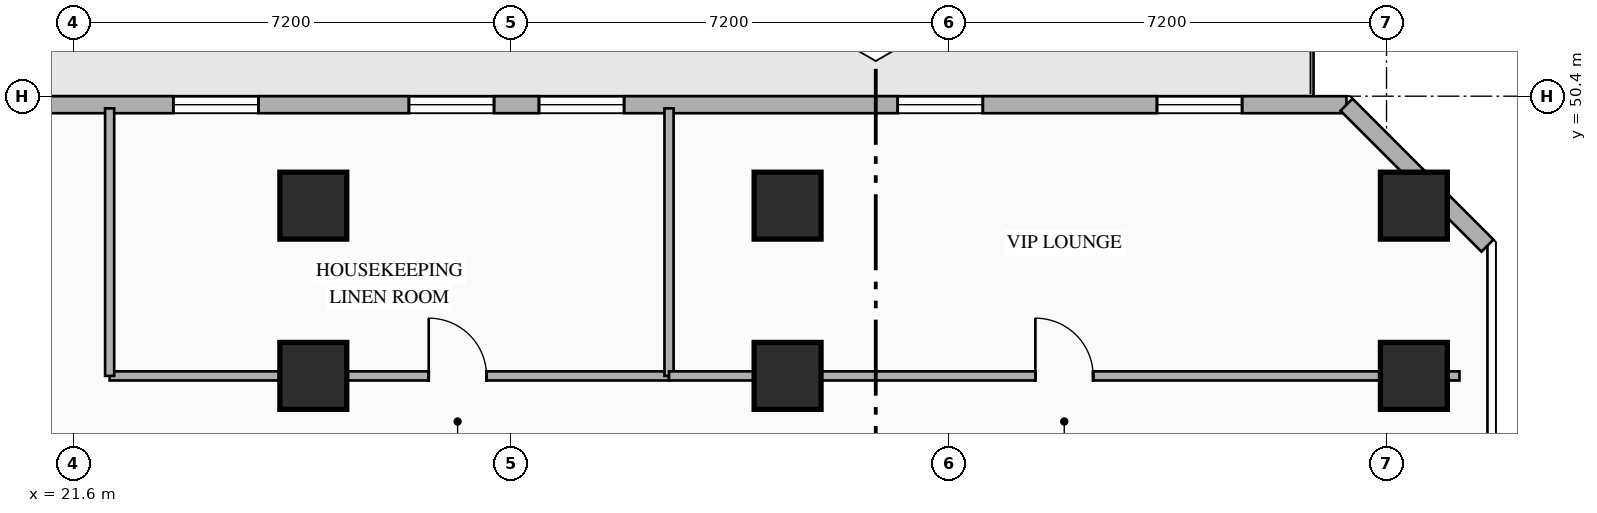
"""IFC4 building model, lengths in metres.
Left out: names, types, materials, properties, quantities, classifications, styles, units other than length and angle.
Written with IfcOpenShell. Run it as: python <this file> out.ifc"""

import sys

from ifc_helpers import new_model, si_unit, direction, frame, frame_2d, origin, origin_2d, place, context, subcontext, project, spatial, rectangle, hollow_rectangle, extrude, element, fill, save


model = new_model("IFC4")
c1 = context("Model", 3, precision=1e-05, world=origin(), true_north=direction((0.0, 1.0)))
c2 = subcontext(c1, "Body", "Model", "MODEL_VIEW")
j1 = project(units=[si_unit("LENGTHUNIT", "METRE"), si_unit("PLANEANGLEUNIT", "RADIAN")], contexts=[c1])
p1 = place(None, origin())
s1 = spatial("IfcSite", under=j1, at=p1, CompositionType="ELEMENT")
p2 = place(p1, origin())
s2 = spatial("IfcBuilding", under=s1, at=p2, CompositionType="ELEMENT")
p3 = place(p2, frame((0.0, 0.0, 39.95)))
s3 = spatial("IfcBuildingStorey", under=s2, at=p3, CompositionType="ELEMENT", Elevation=39.95)
for number, where, z_axis, x_axis in (
    (1, (25.55, 45.8, 0.0), (0.0, 0.0, 1.0), (1.0, 0.0, 0.0)),
    (2, (33.35, 45.8, 0.0), (0.0, 0.0, 1.0), (1.0, 0.0, 0.0)),
    (3, (43.65, 45.8, 0.0), (0.0, 0.0, 1.0), (1.0, 0.0, 0.0)),
    (4, (25.55, 48.6, 0.0), (0.0, 0.0, 1.0), (1.0, 0.0, 0.0)),
    (5, (33.35, 48.6, 0.0), (0.0, 0.0, 1.0), (1.0, 0.0, 0.0)),
    (6, (43.65, 48.6, 0.0), (0.0, 0.0, 1.0), (1.0, 0.0, 0.0)),
):
    element("IfcColumn", number, at=place(p3, frame(where, z_axis=z_axis, x_axis=x_axis)), inside=s3, PredefinedType="COLUMN", context=c2, shape_type="SweptSolid", body=[
        extrude(hollow_rectangle(XDim=1.1, YDim=1.1, WallThickness=0.04, at=origin_2d()), origin(), (0.0, 0.0, 1.0), 3.35),
    ])
p4 = place(p3, frame((2.458, 50.26, 0.0), z_axis=(0.0, 0.0, 1.0), x_axis=(1.0, 0.0, 0.0)))
e7 = element("IfcWall", 7, at=p4, inside=s3, PredefinedType="STANDARD", context=c2, shape_type="SweptSolid", body=[
    extrude(rectangle(XDim=40.084, YDim=0.28, at=frame_2d((20.042, 0.0))), origin(), (0.0, 0.0, 1.0), 3.13),
])
p5 = place(p4, frame((4.26, 0.0, 0.0)))
e8 = element("IfcOpeningElement", 8, at=p5, cuts=e7, PredefinedType="OPENING", context=c2, shape_type="SweptSolid", body=[
    extrude(rectangle(XDim=1.1, YDim=2.2, at=frame_2d((0.55, 1.1))), frame((0.0, 0.15, 0.0), z_axis=(0.0, -1.0, 0.0), x_axis=(1.0, 0.0, 0.0)), (0.0, 0.0, 1.0), 0.3),
])
p6 = place(p4, frame((1.717, 0.0, 0.85)))
e9 = element("IfcOpeningElement", 9, at=p6, cuts=e7, PredefinedType="OPENING", context=c2, shape_type="SweptSolid", body=[
    extrude(rectangle(XDim=1.4, YDim=1.8, at=frame_2d((0.7, 0.9))), frame((0.0, 0.15, 0.0), z_axis=(0.0, -1.0, 0.0), x_axis=(1.0, 0.0, 0.0)), (0.0, 0.0, 1.0), 0.3),
])
p7 = place(p4, frame((10.0, 0.0, 0.85)))
e10 = element("IfcOpeningElement", 10, at=p7, cuts=e7, PredefinedType="OPENING", context=c2, shape_type="SweptSolid", body=[
    extrude(rectangle(XDim=1.4, YDim=1.8, at=frame_2d((0.7, 0.9))), frame((0.0, 0.15, 0.0), z_axis=(0.0, -1.0, 0.0), x_axis=(1.0, 0.0, 0.0)), (0.0, 0.0, 1.0), 0.3),
])
p8 = place(p4, frame((14.02, 0.0, 0.85)))
e11 = element("IfcOpeningElement", 11, at=p8, cuts=e7, PredefinedType="OPENING", context=c2, shape_type="SweptSolid", body=[
    extrude(rectangle(XDim=1.4, YDim=1.8, at=frame_2d((0.7, 0.9))), frame((0.0, 0.15, 0.0), z_axis=(0.0, -1.0, 0.0), x_axis=(1.0, 0.0, 0.0)), (0.0, 0.0, 1.0), 0.3),
])
p9 = place(p4, frame((20.789, 0.0, 0.85)))
e12 = element("IfcOpeningElement", 12, at=p9, cuts=e7, PredefinedType="OPENING", context=c2, shape_type="SweptSolid", body=[
    extrude(rectangle(XDim=1.4, YDim=1.8, at=frame_2d((0.7, 0.9))), frame((0.0, 0.15, 0.0), z_axis=(0.0, -1.0, 0.0), x_axis=(1.0, 0.0, 0.0)), (0.0, 0.0, 1.0), 0.3),
])
p10 = place(p4, frame((24.664, 0.0, 0.85)))
e13 = element("IfcOpeningElement", 13, at=p10, cuts=e7, PredefinedType="OPENING", context=c2, shape_type="SweptSolid", body=[
    extrude(rectangle(XDim=1.4, YDim=1.8, at=frame_2d((0.7, 0.9))), frame((0.0, 0.15, 0.0), z_axis=(0.0, -1.0, 0.0), x_axis=(1.0, 0.0, 0.0)), (0.0, 0.0, 1.0), 0.3),
])
p11 = place(p4, frame((26.803, 0.0, 0.85)))
e14 = element("IfcOpeningElement", 14, at=p11, cuts=e7, PredefinedType="OPENING", context=c2, shape_type="SweptSolid", body=[
    extrude(rectangle(XDim=1.4, YDim=1.8, at=frame_2d((0.7, 0.9))), frame((0.0, 0.15, 0.0), z_axis=(0.0, -1.0, 0.0), x_axis=(1.0, 0.0, 0.0)), (0.0, 0.0, 1.0), 0.3),
])
p12 = place(p4, frame((32.703, 0.0, 0.85)))
e15 = element("IfcOpeningElement", 15, at=p12, cuts=e7, PredefinedType="OPENING", context=c2, shape_type="SweptSolid", body=[
    extrude(rectangle(XDim=1.4, YDim=1.8, at=frame_2d((0.7, 0.9))), frame((0.0, 0.15, 0.0), z_axis=(0.0, -1.0, 0.0), x_axis=(1.0, 0.0, 0.0)), (0.0, 0.0, 1.0), 0.3),
])
p13 = place(p4, frame((36.967, 0.0, 0.85)))
e16 = element("IfcOpeningElement", 16, at=p13, cuts=e7, PredefinedType="OPENING", context=c2, shape_type="SweptSolid", body=[
    extrude(rectangle(XDim=1.4, YDim=1.8, at=frame_2d((0.7, 0.9))), frame((0.0, 0.15, 0.0), z_axis=(0.0, -1.0, 0.0), x_axis=(1.0, 0.0, 0.0)), (0.0, 0.0, 1.0), 0.3),
])
p14 = place(p3, frame((42.542, 50.26, 0.0), z_axis=(0.0, 0.0, 1.0), x_axis=(0.707106781187, -0.707106781187, 0.0)))
e17 = element("IfcWall", 17, at=p14, inside=s3, PredefinedType="STANDARD", context=c2, shape_type="SweptSolid", body=[
    extrude(rectangle(XDim=3.278, YDim=0.28, at=frame_2d((1.639, 0.0))), origin(), (0.0, 0.0, 1.0), 3.13),
])
p15 = place(p3, frame((22.2, 45.8, 0.0), z_axis=(0.0, 0.0, 1.0), x_axis=(1.0, 0.0, 0.0)))
e18 = element("IfcWall", 18, at=p15, inside=s3, PredefinedType="PARTITIONING", context=c2, shape_type="SweptSolid", body=[
    extrude(rectangle(XDim=9.2, YDim=0.15, at=frame_2d((4.6, 0.0))), origin(), (0.0, 0.0, 1.0), 2.425),
])
p16 = place(p15, frame((5.248, 0.0, 0.0)))
e19 = element("IfcOpeningElement", 19, at=p16, cuts=e18, PredefinedType="OPENING", context=c2, shape_type="SweptSolid", body=[
    extrude(rectangle(XDim=0.95, YDim=2.15, at=frame_2d((0.475, 1.075))), frame((0.0, 0.085, 0.0), z_axis=(0.0, -1.0, 0.0), x_axis=(1.0, 0.0, 0.0)), (0.0, 0.0, 1.0), 0.17),
])
for number, where, z_axis, x_axis in (
    (20, (22.2, 45.8, 0.0), (0.0, 0.0, 1.0), (0.0, 1.0, 0.0)),
    (21, (31.4, 45.8, 0.0), (0.0, 0.0, 1.0), (0.0, 1.0, 0.0)),
):
    element("IfcWall", number, at=place(p3, frame(where, z_axis=z_axis, x_axis=x_axis)), inside=s3, PredefinedType="PARTITIONING", context=c2, shape_type="SweptSolid", body=[
        extrude(rectangle(XDim=4.4, YDim=0.15, at=frame_2d((2.2, 0.0))), origin(), (0.0, 0.0, 1.0), 3.13),
    ])
p17 = place(p3, frame((31.4, 45.8, 0.0), z_axis=(0.0, 0.0, 1.0), x_axis=(1.0, 0.0, 0.0)))
e22 = element("IfcWall", 22, at=p17, inside=s3, PredefinedType="PARTITIONING", context=c2, shape_type="SweptSolid", body=[
    extrude(rectangle(XDim=13.0, YDim=0.15, at=frame_2d((6.5, 0.0))), origin(), (0.0, 0.0, 1.0), 2.425),
])
p18 = place(p17, frame((6.025, 0.0, 0.0)))
e23 = element("IfcOpeningElement", 23, at=p18, cuts=e22, PredefinedType="OPENING", context=c2, shape_type="SweptSolid", body=[
    extrude(rectangle(XDim=0.95, YDim=2.15, at=frame_2d((0.475, 1.075))), frame((0.0, 0.085, 0.0), z_axis=(0.0, -1.0, 0.0), x_axis=(1.0, 0.0, 0.0)), (0.0, 0.0, 1.0), 0.17),
])
p19 = place(p9, origin())
e24 = element("IfcWindow", 24, at=p19, inside=s3, PartitioningType="SINGLE_PANEL", PredefinedType="WINDOW", context=c2, shape_type="SweptSolid", body=[
    extrude(rectangle(XDim=1.4, YDim=1.8, at=frame_2d((0.7, 0.9))), frame((0.0, 0.03, 0.0), z_axis=(0.0, -1.0, 0.0), x_axis=(1.0, 0.0, 0.0)), (0.0, 0.0, 1.0), 0.06),
])
fill(e12, e24)
p20 = place(p10, origin())
e25 = element("IfcWindow", 25, at=p20, inside=s3, PartitioningType="SINGLE_PANEL", PredefinedType="WINDOW", context=c2, shape_type="SweptSolid", body=[
    extrude(rectangle(XDim=1.4, YDim=1.8, at=frame_2d((0.7, 0.9))), frame((0.0, 0.03, 0.0), z_axis=(0.0, -1.0, 0.0), x_axis=(1.0, 0.0, 0.0)), (0.0, 0.0, 1.0), 0.06),
])
fill(e13, e25)
p21 = place(p11, origin())
e26 = element("IfcWindow", 26, at=p21, inside=s3, PartitioningType="SINGLE_PANEL", PredefinedType="WINDOW", context=c2, shape_type="SweptSolid", body=[
    extrude(rectangle(XDim=1.4, YDim=1.8, at=frame_2d((0.7, 0.9))), frame((0.0, 0.03, 0.0), z_axis=(0.0, -1.0, 0.0), x_axis=(1.0, 0.0, 0.0)), (0.0, 0.0, 1.0), 0.06),
])
fill(e14, e26)
p22 = place(p12, origin())
e27 = element("IfcWindow", 27, at=p22, inside=s3, PartitioningType="SINGLE_PANEL", PredefinedType="WINDOW", context=c2, shape_type="SweptSolid", body=[
    extrude(rectangle(XDim=1.4, YDim=1.8, at=frame_2d((0.7, 0.9))), frame((0.0, 0.03, 0.0), z_axis=(0.0, -1.0, 0.0), x_axis=(1.0, 0.0, 0.0)), (0.0, 0.0, 1.0), 0.06),
])
fill(e15, e27)
p23 = place(p13, origin())
e28 = element("IfcWindow", 28, at=p23, inside=s3, PartitioningType="SINGLE_PANEL", PredefinedType="WINDOW", context=c2, shape_type="SweptSolid", body=[
    extrude(rectangle(XDim=1.4, YDim=1.8, at=frame_2d((0.7, 0.9))), frame((0.0, 0.03, 0.0), z_axis=(0.0, -1.0, 0.0), x_axis=(1.0, 0.0, 0.0)), (0.0, 0.0, 1.0), 0.06),
])
fill(e16, e28)
p24 = place(p16, origin())
e29 = element("IfcDoor", 29, at=p24, inside=s3, OperationType="SINGLE_SWING_LEFT", PredefinedType="DOOR", context=c2, shape_type="SweptSolid", body=[
    extrude(rectangle(XDim=0.95, YDim=2.15, at=frame_2d((0.475, 1.075))), frame((0.0, 0.025, 0.0), z_axis=(0.0, -1.0, 0.0), x_axis=(1.0, 0.0, 0.0)), (0.0, 0.0, 1.0), 0.05),
])
fill(e19, e29)
p25 = place(p18, origin())
e30 = element("IfcDoor", 30, at=p25, inside=s3, OperationType="SINGLE_SWING_LEFT", PredefinedType="DOOR", context=c2, shape_type="SweptSolid", body=[
    extrude(rectangle(XDim=0.95, YDim=2.15, at=frame_2d((0.475, 1.075))), frame((0.0, 0.025, 0.0), z_axis=(0.0, -1.0, 0.0), x_axis=(1.0, 0.0, 0.0)), (0.0, 0.0, 1.0), 0.05),
])
fill(e23, e30)
save(model, sys.argv[1])
